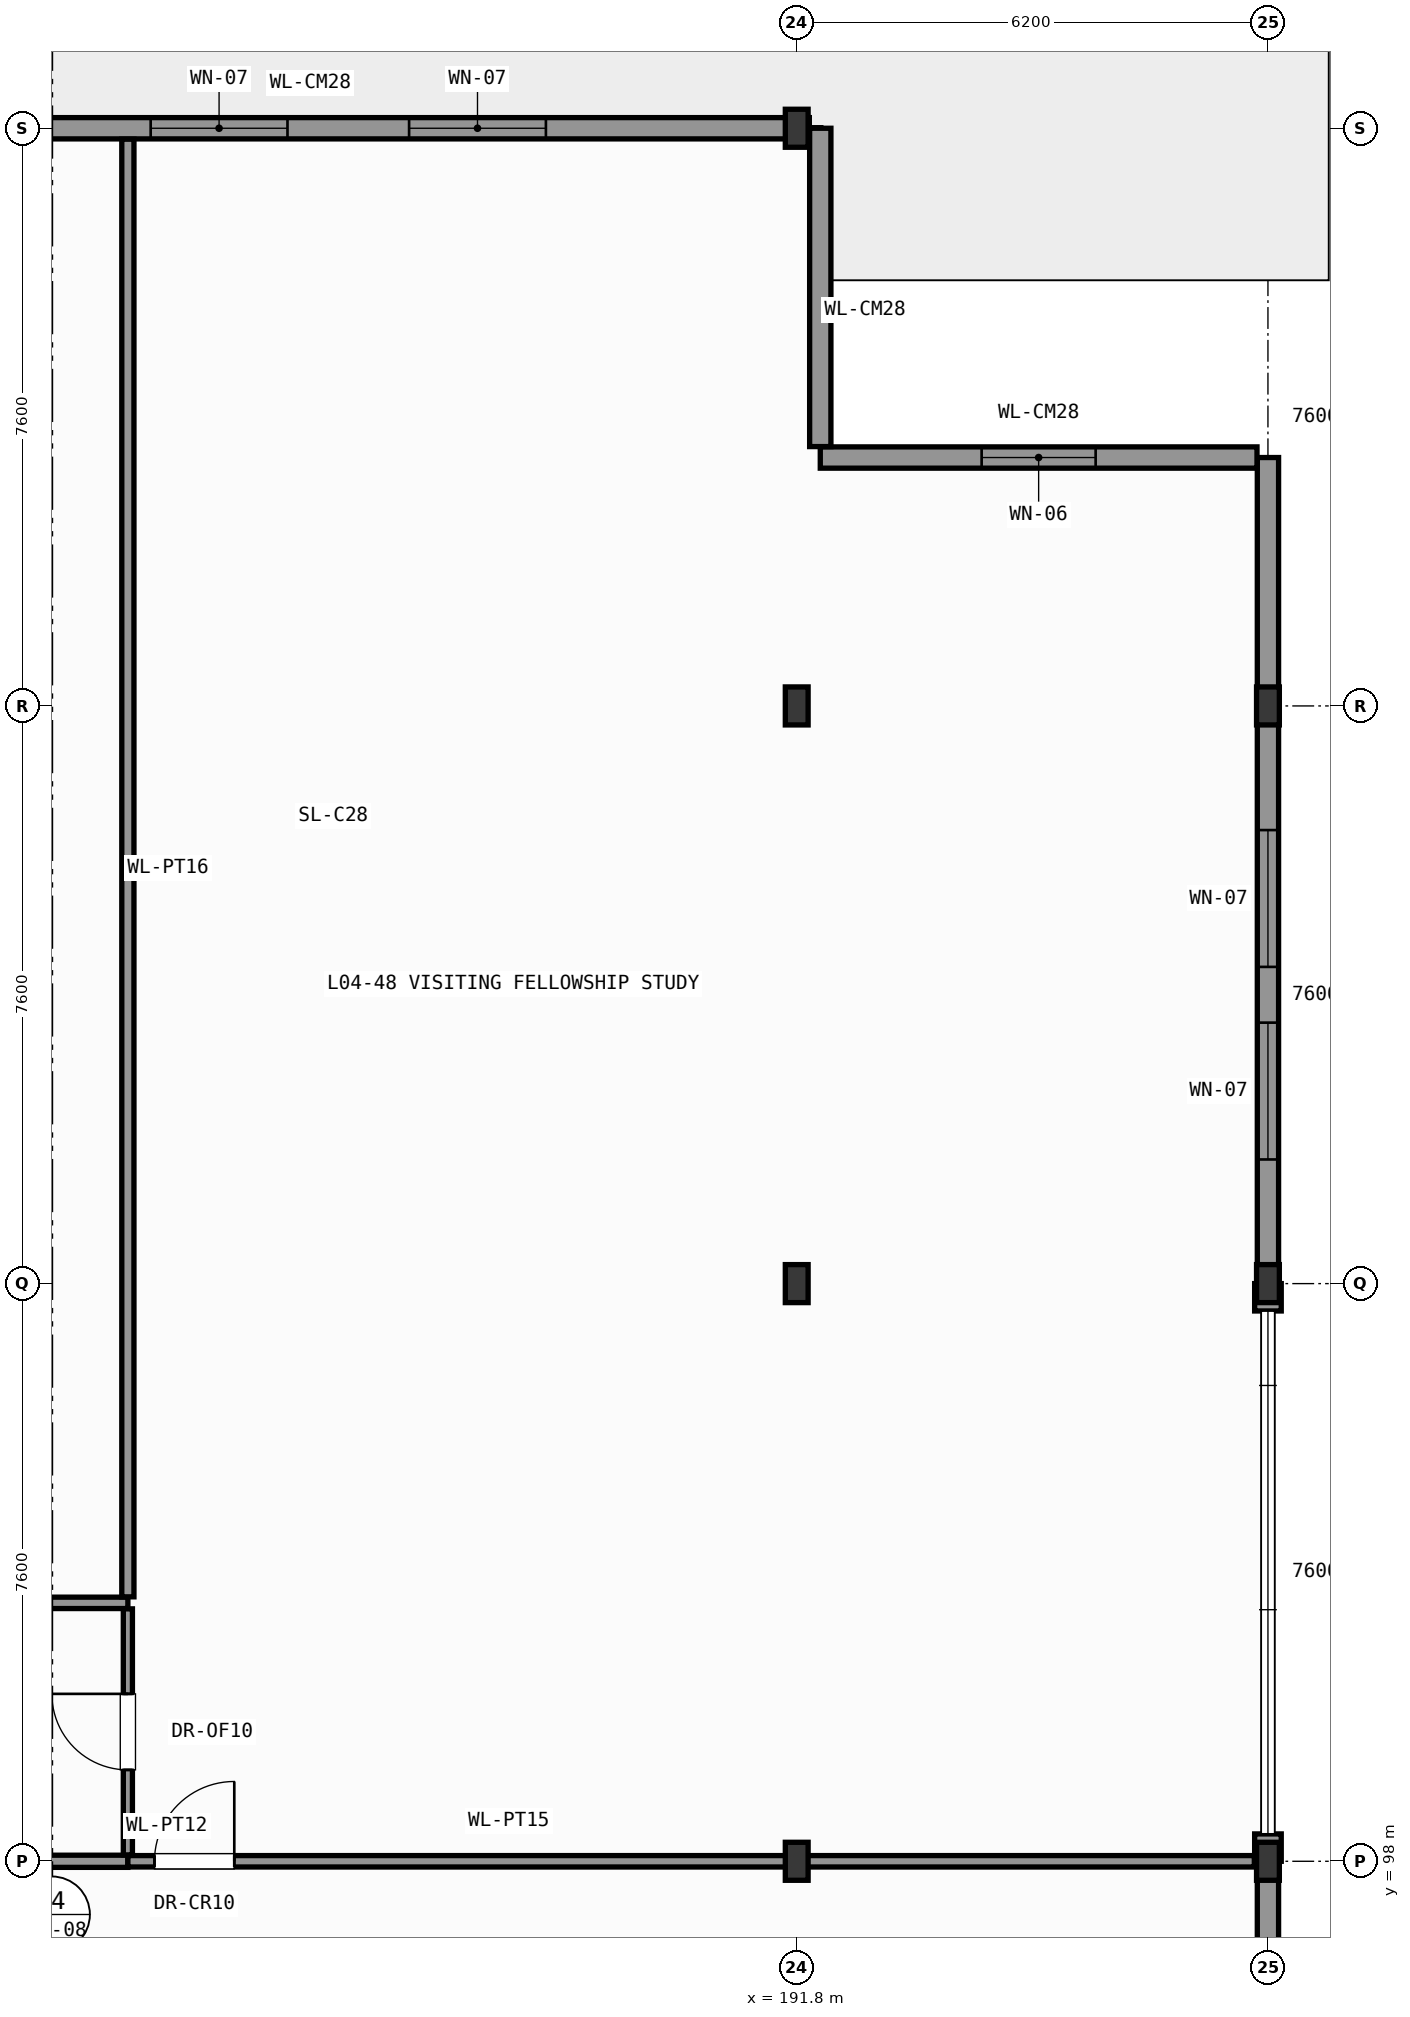
"""IFC4 building model, lengths in metres.
Left out: names, types, materials, properties, quantities, classifications, styles, units other than length and angle.
Written with IfcOpenShell. Run it as: python <this file> out.ifc"""

import sys

from ifc_helpers import new_model, si_unit, direction, frame, frame_2d, origin, origin_2d, place, context, subcontext, project, spatial, rectangle, i_section, extrude, element, fill, save


model = new_model("IFC4")
c1 = context("Model", 3, precision=1e-05, world=origin(), true_north=direction((0.0, 1.0)))
c2 = subcontext(c1, "Body", "Model", "MODEL_VIEW")
j1 = project(units=[si_unit("LENGTHUNIT", "METRE"), si_unit("PLANEANGLEUNIT", "RADIAN")], contexts=[c1])
p1 = place(None, origin())
s1 = spatial("IfcSite", under=j1, at=p1, CompositionType="ELEMENT")
p2 = place(p1, origin())
s2 = spatial("IfcBuilding", under=s1, at=p2, CompositionType="ELEMENT")
p3 = place(p2, frame((0.0, 0.0, 18.0)))
s3 = spatial("IfcBuildingStorey", under=s2, at=p3, CompositionType="ELEMENT", Elevation=18.0)
for number, where, z_axis, x_axis in (
    (1, (191.8, 98.0, 0.0), (0.0, 0.0, 1.0), (1.0, 0.0, 0.0)),
    (2, (191.8, 105.6, 0.0), (0.0, 0.0, 1.0), (1.0, 0.0, 0.0)),
    (3, (191.8, 113.2, 0.0), (0.0, 0.0, 1.0), (1.0, 0.0, 0.0)),
    (4, (191.8, 120.8, 0.0), (0.0, 0.0, 1.0), (1.0, 0.0, 0.0)),
    (5, (198.0, 98.0, 0.0), (0.0, 0.0, 1.0), (1.0, 0.0, 0.0)),
    (6, (198.0, 105.6, 0.0), (0.0, 0.0, 1.0), (1.0, 0.0, 0.0)),
    (7, (198.0, 113.2, 0.0), (0.0, 0.0, 1.0), (1.0, 0.0, 0.0)),
):
    element("IfcColumn", number, at=place(p3, frame(where, z_axis=z_axis, x_axis=x_axis)), inside=s3, PredefinedType="COLUMN", context=c2, shape_type="SweptSolid", body=[
        extrude(i_section(OverallWidth=0.3, OverallDepth=0.5, WebThickness=0.014, FlangeThickness=0.028, FilletRadius=0.027, at=origin_2d()), origin(), (0.0, 0.0, 1.0), 4.2),
    ])
p4 = place(p3, frame((198.0, 98.0, 0.0), z_axis=(0.0, 0.0, 1.0), x_axis=(0.0, -1.0, 0.0)))
e8 = element("IfcWall", 8, at=p4, inside=s3, PredefinedType="SOLIDWALL", context=c2, shape_type="SweptSolid", body=[
    extrude(rectangle(XDim=7.6, YDim=0.28, at=frame_2d((3.8, 0.0))), origin(), (0.0, 0.0, 1.0), 3.645),
])
p5 = place(p4, frame((1.483, 0.0, 0.95)))
e9 = element("IfcOpeningElement", 9, at=p5, cuts=e8, PredefinedType="OPENING", context=c2, shape_type="SweptSolid", body=[
    extrude(rectangle(XDim=2.1, YDim=2.29, at=frame_2d((1.05, 1.145))), frame((0.0, 0.15, 0.0), z_axis=(0.0, -1.0, 0.0), x_axis=(1.0, 0.0, 0.0)), (0.0, 0.0, 1.0), 0.3),
])
p6 = place(p4, frame((4.017, 0.0, 0.95)))
e10 = element("IfcOpeningElement", 10, at=p6, cuts=e8, PredefinedType="OPENING", context=c2, shape_type="SweptSolid", body=[
    extrude(rectangle(XDim=2.1, YDim=2.29, at=frame_2d((1.05, 1.145))), frame((0.0, 0.15, 0.0), z_axis=(0.0, -1.0, 0.0), x_axis=(1.0, 0.0, 0.0)), (0.0, 0.0, 1.0), 0.3),
])
for number, where, z_axis, x_axis in (
    (11, (198.0, 98.0, 0.0), (0.0, 0.0, 1.0), (0.0, 1.0, 0.0)),
    (12, (198.0, 105.24, 0.0), (0.0, 0.0, 1.0), (0.0, 1.0, 0.0)),
):
    element("IfcWall", number, at=place(p3, frame(where, z_axis=z_axis, x_axis=x_axis)), inside=s3, PredefinedType="SOLIDWALL", context=c2, shape_type="SweptSolid", body=[
        extrude(rectangle(XDim=0.36, YDim=0.35, at=frame_2d((0.18, 0.0))), origin(), (0.0, 0.0, 1.0), 3.645),
    ])
p7 = place(p3, frame((198.0, 113.2, 0.0), z_axis=(0.0, 0.0, 1.0), x_axis=(0.0, -1.0, 0.0)))
e13 = element("IfcWall", 13, at=p7, inside=s3, PredefinedType="SOLIDWALL", context=c2, shape_type="SweptSolid", body=[
    extrude(rectangle(XDim=7.6, YDim=0.28, at=frame_2d((3.8, 0.0))), origin(), (0.0, 0.0, 1.0), 3.645),
])
p8 = place(p7, frame((1.633, 0.0, 0.95)))
e14 = element("IfcOpeningElement", 14, at=p8, cuts=e13, PredefinedType="OPENING", context=c2, shape_type="SweptSolid", body=[
    extrude(rectangle(XDim=1.8, YDim=2.29, at=frame_2d((0.9, 1.145))), frame((0.0, 0.15, 0.0), z_axis=(0.0, -1.0, 0.0), x_axis=(1.0, 0.0, 0.0)), (0.0, 0.0, 1.0), 0.3),
])
p9 = place(p7, frame((4.167, 0.0, 0.95)))
e15 = element("IfcOpeningElement", 15, at=p9, cuts=e13, PredefinedType="OPENING", context=c2, shape_type="SweptSolid", body=[
    extrude(rectangle(XDim=1.8, YDim=2.29, at=frame_2d((0.9, 1.145))), frame((0.0, 0.15, 0.0), z_axis=(0.0, -1.0, 0.0), x_axis=(1.0, 0.0, 0.0)), (0.0, 0.0, 1.0), 0.3),
])
p10 = place(p3, frame((198.0, 116.468, 0.0), z_axis=(0.0, 0.0, 1.0), x_axis=(0.0, -1.0, 0.0)))
e16 = element("IfcWall", 16, at=p10, inside=s3, PredefinedType="SOLIDWALL", context=c2, shape_type="SweptSolid", body=[
    extrude(rectangle(XDim=3.268, YDim=0.28, at=frame_2d((1.634, 0.0))), origin(), (0.0, 0.0, 1.0), 3.98),
])
p11 = place(p3, frame((192.11, 116.468, 0.0), z_axis=(0.0, 0.0, 1.0), x_axis=(1.0, 0.0, 0.0)))
e17 = element("IfcWall", 17, at=p11, inside=s3, PredefinedType="SOLIDWALL", context=c2, shape_type="SweptSolid", body=[
    extrude(rectangle(XDim=5.746, YDim=0.28, at=frame_2d((2.873, 0.0))), origin(), (0.0, 0.0, 1.0), 3.98),
])
p12 = place(p11, frame((2.123, 0.0, 0.95)))
e18 = element("IfcOpeningElement", 18, at=p12, cuts=e17, PredefinedType="OPENING", context=c2, shape_type="SweptSolid", body=[
    extrude(rectangle(XDim=1.5, YDim=2.4, at=frame_2d((0.75, 1.2))), frame((0.0, 0.15, 0.0), z_axis=(0.0, -1.0, 0.0), x_axis=(1.0, 0.0, 0.0)), (0.0, 0.0, 1.0), 0.3),
])
p13 = place(p3, frame((192.11, 120.8, 0.0), z_axis=(0.0, 0.0, 1.0), x_axis=(0.0, -1.0, 0.0)))
e19 = element("IfcWall", 19, at=p13, inside=s3, PredefinedType="SOLIDWALL", context=c2, shape_type="SweptSolid", body=[
    extrude(rectangle(XDim=4.188, YDim=0.28, at=frame_2d((2.094, 0.0))), origin(), (0.0, 0.0, 1.0), 3.645),
])
p14 = place(p3, frame((179.0, 120.8, 0.0), z_axis=(0.0, 0.0, 1.0), x_axis=(1.0, 0.0, 0.0)))
e20 = element("IfcWall", 20, at=p14, inside=s3, PredefinedType="SOLIDWALL", context=c2, shape_type="SweptSolid", body=[
    extrude(rectangle(XDim=12.966, YDim=0.28, at=frame_2d((6.483, 0.0))), origin(), (0.0, 0.0, 1.0), 3.385),
])
p15 = place(p14, frame((4.3, 0.0, 0.95)))
e21 = element("IfcOpeningElement", 21, at=p15, cuts=e20, PredefinedType="OPENING", context=c2, shape_type="SweptSolid", body=[
    extrude(rectangle(XDim=1.8, YDim=2.04, at=frame_2d((0.9, 1.02))), frame((0.0, 0.15, 0.0), z_axis=(0.0, -1.0, 0.0), x_axis=(1.0, 0.0, 0.0)), (0.0, 0.0, 1.0), 0.3),
])
p16 = place(p14, frame((7.7, 0.0, 0.95)))
e22 = element("IfcOpeningElement", 22, at=p16, cuts=e20, PredefinedType="OPENING", context=c2, shape_type="SweptSolid", body=[
    extrude(rectangle(XDim=1.8, YDim=2.04, at=frame_2d((0.9, 1.02))), frame((0.0, 0.15, 0.0), z_axis=(0.0, -1.0, 0.0), x_axis=(1.0, 0.0, 0.0)), (0.0, 0.0, 1.0), 0.3),
])
p17 = place(p3, frame((170.479, 98.0, 0.0), z_axis=(0.0, 0.0, 1.0), x_axis=(1.0, 0.0, 0.0)))
e23 = element("IfcWall", 23, at=p17, inside=s3, PredefinedType="PARTITIONING", context=c2, shape_type="SweptSolid", body=[
    extrude(rectangle(XDim=12.521, YDim=0.16, at=frame_2d((6.26, 0.0))), origin(), (0.0, 0.0, 1.0), 3.385),
])
p18 = place(p17, frame((5.785, 0.0, 0.0)))
e24 = element("IfcOpeningElement", 24, at=p18, cuts=e23, PredefinedType="OPENING", context=c2, shape_type="SweptSolid", body=[
    extrude(rectangle(XDim=0.95, YDim=2.1, at=frame_2d((0.475, 1.05))), frame((0.0, 0.09, 0.0), z_axis=(0.0, -1.0, 0.0), x_axis=(1.0, 0.0, 0.0)), (0.0, 0.0, 1.0), 0.18),
])
p19 = place(p3, frame((183.0, 98.0, 0.0), z_axis=(0.0, 0.0, 1.0), x_axis=(1.0, 0.0, 0.0)))
e25 = element("IfcWall", 25, at=p19, inside=s3, PredefinedType="PARTITIONING", context=c2, shape_type="SweptSolid", body=[
    extrude(rectangle(XDim=14.821, YDim=0.15, at=frame_2d((7.411, 0.0))), origin(), (0.0, 0.0, 1.0), 3.285),
])
p20 = place(p19, frame((0.35, 0.0, 0.0)))
e26 = element("IfcOpeningElement", 26, at=p20, cuts=e25, PredefinedType="OPENING", context=c2, shape_type="SweptSolid", body=[
    extrude(rectangle(XDim=1.05, YDim=2.2, at=frame_2d((0.525, 1.1))), frame((0.0, 0.085, 0.0), z_axis=(0.0, -1.0, 0.0), x_axis=(1.0, 0.0, 0.0)), (0.0, 0.0, 1.0), 0.17),
])
p21 = place(p3, frame((170.484, 101.4, 0.0), z_axis=(0.0, 0.0, 1.0), x_axis=(1.0, 0.0, 0.0)))
e27 = element("IfcWall", 27, at=p21, inside=s3, PredefinedType="PARTITIONING", context=c2, shape_type="SweptSolid", body=[
    extrude(rectangle(XDim=12.516, YDim=0.15, at=frame_2d((6.258, 0.0))), origin(), (0.0, 0.0, 1.0), 3.98),
])
p22 = place(p21, frame((5.533, 0.0, 0.0)))
e28 = element("IfcOpeningElement", 28, at=p22, cuts=e27, PredefinedType="OPENING", context=c2, shape_type="SweptSolid", body=[
    extrude(rectangle(XDim=1.45, YDim=2.35, at=frame_2d((0.725, 1.175))), frame((0.0, 0.085, 0.0), z_axis=(0.0, -1.0, 0.0), x_axis=(1.0, 0.0, 0.0)), (0.0, 0.0, 1.0), 0.17),
])
p23 = place(p3, frame((183.0, 98.084, 0.0), z_axis=(0.0, 0.0, 1.0), x_axis=(0.0, 1.0, 0.0)))
e29 = element("IfcWall", 29, at=p23, inside=s3, PredefinedType="PARTITIONING", context=c2, shape_type="SweptSolid", body=[
    extrude(rectangle(XDim=3.237, YDim=0.12, at=frame_2d((1.619, 0.0))), origin(), (0.0, 0.0, 1.0), 3.98),
])
p24 = place(p23, frame((1.118, 0.0, 0.0)))
e30 = element("IfcOpeningElement", 30, at=p24, cuts=e29, PredefinedType="OPENING", context=c2, shape_type="SweptSolid", body=[
    extrude(rectangle(XDim=1.0, YDim=2.15, at=frame_2d((0.5, 1.075))), frame((0.0, 0.07, 0.0), z_axis=(0.0, -1.0, 0.0), x_axis=(1.0, 0.0, 0.0)), (0.0, 0.0, 1.0), 0.14),
])
p25 = place(p3, frame((183.0, 101.479, 0.0), z_axis=(0.0, 0.0, 1.0), x_axis=(0.0, 1.0, 0.0)))
e31 = element("IfcWall", 31, at=p25, inside=s3, PredefinedType="PARTITIONING", context=c2, shape_type="SweptSolid", body=[
    extrude(rectangle(XDim=19.177, YDim=0.16, at=frame_2d((9.588, 0.0))), origin(), (0.0, 0.0, 1.0), 3.98),
])
p26 = place(p8, origin())
e32 = element("IfcWindow", 32, at=p26, inside=s3, PartitioningType="SINGLE_PANEL", PredefinedType="WINDOW", context=c2, shape_type="SweptSolid", body=[
    extrude(rectangle(XDim=1.8, YDim=2.29, at=frame_2d((0.9, 1.145))), frame((0.0, 0.03, 0.0), z_axis=(0.0, -1.0, 0.0), x_axis=(1.0, 0.0, 0.0)), (0.0, 0.0, 1.0), 0.06),
])
fill(e14, e32)
p27 = place(p9, origin())
e33 = element("IfcWindow", 33, at=p27, inside=s3, PartitioningType="SINGLE_PANEL", PredefinedType="WINDOW", context=c2, shape_type="SweptSolid", body=[
    extrude(rectangle(XDim=1.8, YDim=2.29, at=frame_2d((0.9, 1.145))), frame((0.0, 0.03, 0.0), z_axis=(0.0, -1.0, 0.0), x_axis=(1.0, 0.0, 0.0)), (0.0, 0.0, 1.0), 0.06),
])
fill(e15, e33)
p28 = place(p12, origin())
e34 = element("IfcWindow", 34, at=p28, inside=s3, PartitioningType="SINGLE_PANEL", PredefinedType="WINDOW", context=c2, shape_type="SweptSolid", body=[
    extrude(rectangle(XDim=1.5, YDim=2.4, at=frame_2d((0.75, 1.2))), frame((0.0, 0.03, 0.0), z_axis=(0.0, -1.0, 0.0), x_axis=(1.0, 0.0, 0.0)), (0.0, 0.0, 1.0), 0.06),
])
fill(e18, e34)
p29 = place(p15, origin())
e35 = element("IfcWindow", 35, at=p29, inside=s3, PartitioningType="SINGLE_PANEL", PredefinedType="WINDOW", context=c2, shape_type="SweptSolid", body=[
    extrude(rectangle(XDim=1.8, YDim=2.04, at=frame_2d((0.9, 1.02))), frame((0.0, 0.03, 0.0), z_axis=(0.0, -1.0, 0.0), x_axis=(1.0, 0.0, 0.0)), (0.0, 0.0, 1.0), 0.06),
])
fill(e21, e35)
p30 = place(p16, origin())
e36 = element("IfcWindow", 36, at=p30, inside=s3, PartitioningType="SINGLE_PANEL", PredefinedType="WINDOW", context=c2, shape_type="SweptSolid", body=[
    extrude(rectangle(XDim=1.8, YDim=2.04, at=frame_2d((0.9, 1.02))), frame((0.0, 0.03, 0.0), z_axis=(0.0, -1.0, 0.0), x_axis=(1.0, 0.0, 0.0)), (0.0, 0.0, 1.0), 0.06),
])
fill(e22, e36)
p31 = place(p20, origin())
e37 = element("IfcDoor", 37, at=p31, inside=s3, OperationType="SINGLE_SWING_RIGHT", PredefinedType="DOOR", context=c2, shape_type="SweptSolid", body=[
    extrude(rectangle(XDim=1.05, YDim=2.2, at=frame_2d((0.525, 1.1))), frame((0.0, 0.025, 0.0), z_axis=(0.0, -1.0, 0.0), x_axis=(1.0, 0.0, 0.0)), (0.0, 0.0, 1.0), 0.05),
])
fill(e26, e37)
p32 = place(p24, origin())
e38 = element("IfcDoor", 38, at=p32, inside=s3, OperationType="SINGLE_SWING_RIGHT", PredefinedType="DOOR", context=c2, shape_type="SweptSolid", body=[
    extrude(rectangle(XDim=1.0, YDim=2.15, at=frame_2d((0.5, 1.075))), frame((0.0, 0.025, 0.0), z_axis=(0.0, -1.0, 0.0), x_axis=(1.0, 0.0, 0.0)), (0.0, 0.0, 1.0), 0.05),
])
fill(e30, e38)
save(model, sys.argv[1])
